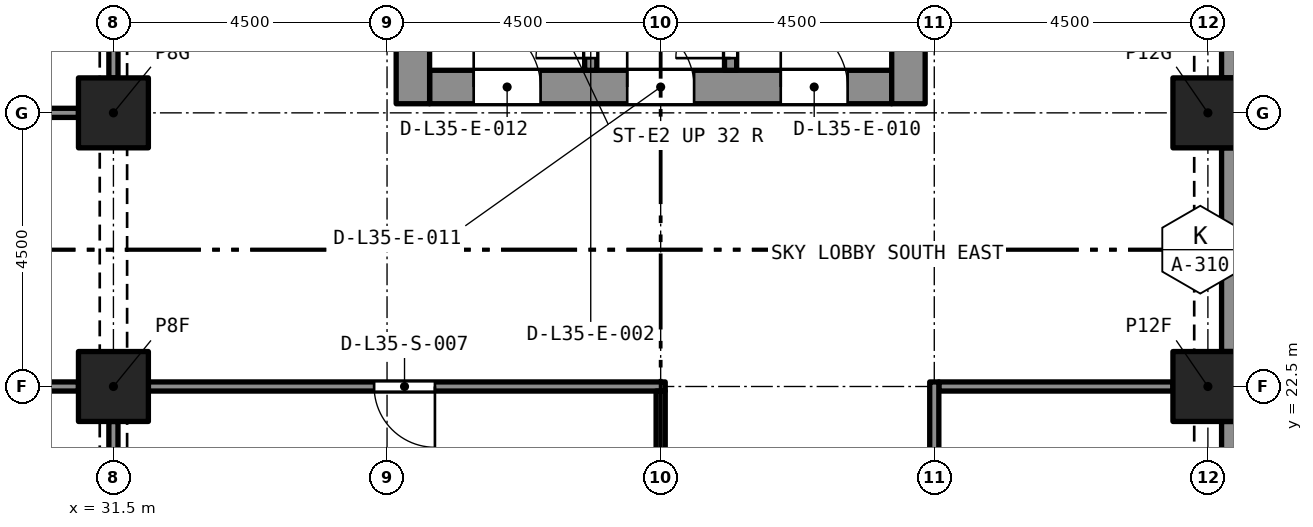
"""IFC4 building model, lengths in metres.
Left out: names, types, materials, properties, quantities, classifications, styles, units other than length and angle.
Written with IfcOpenShell. Run it as: python <this file> out.ifc"""

import sys

from ifc_helpers import new_model, si_unit, direction, frame, frame_2d, origin, origin_2d, place, context, subcontext, project, spatial, rectangle, extrude, element, fill, save


model = new_model("IFC4")
c1 = context("Model", 3, precision=1e-05, world=origin(), true_north=direction((0.0, 1.0)))
c2 = subcontext(c1, "Body", "Model", "MODEL_VIEW")
j1 = project(units=[si_unit("LENGTHUNIT", "METRE"), si_unit("PLANEANGLEUNIT", "RADIAN")], contexts=[c1])
p1 = place(None, origin())
s1 = spatial("IfcSite", under=j1, at=p1, CompositionType="ELEMENT")
p2 = place(p1, origin())
s2 = spatial("IfcBuilding", under=s1, at=p2, CompositionType="ELEMENT")
p3 = place(p2, frame((0.0, 0.0, 124.8)))
s3 = spatial("IfcBuildingStorey", under=s2, at=p3, CompositionType="ELEMENT", Elevation=124.8)
for number, where, z_axis, x_axis in (
    (1, (31.5, 22.5, 0.0), (0.0, 0.0, 1.0), (1.0, 0.0, 0.0)),
    (2, (49.5, 22.5, 0.0), (0.0, 0.0, 1.0), (1.0, 0.0, 0.0)),
    (3, (31.5, 27.0, 0.0), (0.0, 0.0, 1.0), (1.0, 0.0, 0.0)),
    (4, (49.5, 27.0, 0.0), (0.0, 0.0, 1.0), (1.0, 0.0, 0.0)),
):
    element("IfcColumn", number, at=place(p3, frame(where, z_axis=z_axis, x_axis=x_axis)), inside=s3, PredefinedType="COLUMN", context=c2, shape_type="SweptSolid", body=[
        extrude(rectangle(XDim=1.15, YDim=1.15, at=origin_2d()), origin(), (0.0, 0.0, 1.0), 5.4),
    ])
p4 = place(p3, frame((36.7, 27.425, 0.0), z_axis=(0.0, 0.0, 1.0), x_axis=(1.0, 0.0, 0.0)))
e5 = element("IfcWall", 5, at=p4, inside=s3, PredefinedType="SOLIDWALL", context=c2, shape_type="SweptSolid", body=[
    extrude(rectangle(XDim=7.6, YDim=0.55, at=frame_2d((3.8, 0.0))), origin(), (0.0, 0.0, 1.0), 5.4),
])
p5 = place(p4, frame((5.775, 0.0, 0.0)))
e6 = element("IfcOpeningElement", 6, at=p5, cuts=e5, PredefinedType="OPENING", context=c2, shape_type="SweptSolid", body=[
    extrude(rectangle(XDim=1.1, YDim=2.1, at=frame_2d((0.55, 1.05))), frame((0.0, 0.285, 0.0), z_axis=(0.0, -1.0, 0.0), x_axis=(1.0, 0.0, 0.0)), (0.0, 0.0, 1.0), 0.57),
])
p6 = place(p4, frame((3.25, 0.0, 0.0)))
e7 = element("IfcOpeningElement", 7, at=p6, cuts=e5, PredefinedType="OPENING", context=c2, shape_type="SweptSolid", body=[
    extrude(rectangle(XDim=1.1, YDim=2.1, at=frame_2d((0.55, 1.05))), frame((0.0, 0.285, 0.0), z_axis=(0.0, -1.0, 0.0), x_axis=(1.0, 0.0, 0.0)), (0.0, 0.0, 1.0), 0.57),
])
p7 = place(p4, frame((0.725, 0.0, 0.0)))
e8 = element("IfcOpeningElement", 8, at=p7, cuts=e5, PredefinedType="OPENING", context=c2, shape_type="SweptSolid", body=[
    extrude(rectangle(XDim=1.1, YDim=2.1, at=frame_2d((0.55, 1.05))), frame((0.0, 0.285, 0.0), z_axis=(0.0, -1.0, 0.0), x_axis=(1.0, 0.0, 0.0)), (0.0, 0.0, 1.0), 0.57),
])
p8 = place(p3, frame((36.425, 27.15, 0.0), z_axis=(0.0, 0.0, 1.0), x_axis=(0.0, 1.0, 0.0)))
e9 = element("IfcWall", 9, at=p8, inside=s3, PredefinedType="SOLIDWALL", context=c2, shape_type="SweptSolid", body=[
    extrude(rectangle(XDim=13.2, YDim=0.55, at=frame_2d((6.6, 0.0))), origin(), (0.0, 0.0, 1.0), 5.4),
])
p9 = place(p8, frame((8.8, 0.0, 0.0)))
e10 = element("IfcOpeningElement", 10, at=p9, cuts=e9, PredefinedType="OPENING", context=c2, shape_type="SweptSolid", body=[
    extrude(rectangle(XDim=1.2, YDim=2.1, at=frame_2d((0.6, 1.05))), frame((0.0, 0.285, 0.0), z_axis=(0.0, -1.0, 0.0), x_axis=(1.0, 0.0, 0.0)), (0.0, 0.0, 1.0), 0.57),
])
p10 = place(p3, frame((44.575, 27.15, 0.0), z_axis=(0.0, 0.0, 1.0), x_axis=(0.0, 1.0, 0.0)))
e11 = element("IfcWall", 11, at=p10, inside=s3, PredefinedType="SOLIDWALL", context=c2, shape_type="SweptSolid", body=[
    extrude(rectangle(XDim=13.2, YDim=0.55, at=frame_2d((6.6, 0.0))), origin(), (0.0, 0.0, 1.0), 5.4),
])
p11 = place(p10, frame((8.8, 0.0, 0.0)))
e12 = element("IfcOpeningElement", 12, at=p11, cuts=e11, PredefinedType="OPENING", context=c2, shape_type="SweptSolid", body=[
    extrude(rectangle(XDim=1.2, YDim=2.1, at=frame_2d((0.6, 1.05))), frame((0.0, 0.285, 0.0), z_axis=(0.0, -1.0, 0.0), x_axis=(1.0, 0.0, 0.0)), (0.0, 0.0, 1.0), 0.57),
])
for number, where, z_axis, x_axis in (
    (13, (49.875, 21.925, 0.0), (0.0, 0.0, 1.0), (0.0, -1.0, 0.0)),
    (14, (49.875, 26.425, 0.0), (0.0, 0.0, 1.0), (0.0, -1.0, 0.0)),
    (15, (49.875, 30.925, 0.0), (0.0, 0.0, 1.0), (0.0, -1.0, 0.0)),
):
    element("IfcWall", number, at=place(p3, frame(where, z_axis=z_axis, x_axis=x_axis)), inside=s3, PredefinedType="SOLIDWALL", context=c2, shape_type="SweptSolid", body=[
        extrude(rectangle(XDim=3.35, YDim=0.3, at=frame_2d((1.675, 0.0))), origin(), (0.0, 0.0, 1.0), 5.4),
    ])
p12 = place(p3, frame((41.65, 27.7, 0.0), z_axis=(0.0, 0.0, 1.0), x_axis=(0.0, 1.0, 0.0)))
e16 = element("IfcWall", 16, at=p12, inside=s3, PredefinedType="SOLIDWALL", context=c2, shape_type="SweptSolid", body=[
    extrude(rectangle(XDim=5.4, YDim=0.2, at=frame_2d((2.7, 0.0))), origin(), (0.0, 0.0, 1.0), 5.1),
])
p13 = place(p12, frame((0.2, 0.0, 0.0)))
e17 = element("IfcOpeningElement", 17, at=p13, cuts=e16, PredefinedType="OPENING", context=c2, shape_type="SweptSolid", body=[
    extrude(rectangle(XDim=0.9, YDim=2.1, at=frame_2d((0.45, 1.05))), frame((0.0, 0.11, 0.0), z_axis=(0.0, -1.0, 0.0), x_axis=(1.0, 0.0, 0.0)), (0.0, 0.0, 1.0), 0.22),
])
p14 = place(p3, frame((39.35, 27.7, 0.0), z_axis=(0.0, 0.0, 1.0), x_axis=(0.0, 1.0, 0.0)))
e18 = element("IfcWall", 18, at=p14, inside=s3, PredefinedType="SOLIDWALL", context=c2, shape_type="SweptSolid", body=[
    extrude(rectangle(XDim=5.4, YDim=0.2, at=frame_2d((2.7, 0.0))), origin(), (0.0, 0.0, 1.0), 5.1),
])
p15 = place(p14, frame((0.2, 0.0, 0.0)))
e19 = element("IfcOpeningElement", 19, at=p15, cuts=e18, PredefinedType="OPENING", context=c2, shape_type="SweptSolid", body=[
    extrude(rectangle(XDim=0.9, YDim=2.1, at=frame_2d((0.45, 1.05))), frame((0.0, 0.11, 0.0), z_axis=(0.0, -1.0, 0.0), x_axis=(1.0, 0.0, 0.0)), (0.0, 0.0, 1.0), 0.22),
])
p16 = place(p3, frame((18.575, 27.0, 0.0), z_axis=(0.0, 0.0, 1.0), x_axis=(1.0, 0.0, 0.0)))
e20 = element("IfcWall", 20, at=p16, inside=s3, PredefinedType="PARTITIONING", context=c2, shape_type="SweptSolid", body=[
    extrude(rectangle(XDim=12.35, YDim=0.15, at=frame_2d((6.175, 0.0))), origin(), (0.0, 0.0, 1.0), 4.95),
])
p17 = place(p16, frame((5.425, 0.0, 0.0)))
e21 = element("IfcOpeningElement", 21, at=p17, cuts=e20, PredefinedType="OPENING", context=c2, shape_type="SweptSolid", body=[
    extrude(rectangle(XDim=1.5, YDim=2.4, at=frame_2d((0.75, 1.2))), frame((0.0, 0.085, 0.0), z_axis=(0.0, -1.0, 0.0), x_axis=(1.0, 0.0, 0.0)), (0.0, 0.0, 1.0), 0.17),
])
p18 = place(p3, frame((30.925, 22.5, 0.0), z_axis=(0.0, 0.0, 1.0), x_axis=(-1.0, 0.0, 0.0)))
e22 = element("IfcWall", 22, at=p18, inside=s3, PredefinedType="PARTITIONING", context=c2, shape_type="SweptSolid", body=[
    extrude(rectangle(XDim=12.35, YDim=0.15, at=frame_2d((6.175, 0.0))), origin(), (0.0, 0.0, 1.0), 4.95),
])
p19 = place(p18, frame((5.425, 0.0, 0.0)))
e23 = element("IfcOpeningElement", 23, at=p19, cuts=e22, PredefinedType="OPENING", context=c2, shape_type="SweptSolid", body=[
    extrude(rectangle(XDim=1.5, YDim=2.4, at=frame_2d((0.75, 1.2))), frame((0.0, 0.085, 0.0), z_axis=(0.0, -1.0, 0.0), x_axis=(1.0, 0.0, 0.0)), (0.0, 0.0, 1.0), 0.17),
])
for number, where, z_axis, x_axis in (
    (24, (31.5, 27.575, 0.0), (0.0, 0.0, 1.0), (0.0, 1.0, 0.0)),
    (25, (31.5, 18.575, 0.0), (0.0, 0.0, 1.0), (0.0, 1.0, 0.0)),
):
    element("IfcWall", number, at=place(p3, frame(where, z_axis=z_axis, x_axis=x_axis)), inside=s3, PredefinedType="PARTITIONING", context=c2, shape_type="SweptSolid", body=[
        extrude(rectangle(XDim=3.35, YDim=0.15, at=frame_2d((1.675, 0.0))), origin(), (0.0, 0.0, 1.0), 4.58),
    ])
p20 = place(p3, frame((40.575, 22.5, 0.0), z_axis=(0.0, 0.0, 1.0), x_axis=(-1.0, 0.0, 0.0)))
e26 = element("IfcWall", 26, at=p20, inside=s3, PredefinedType="PARTITIONING", context=c2, shape_type="SweptSolid", body=[
    extrude(rectangle(XDim=8.5, YDim=0.15, at=frame_2d((4.25, 0.0))), origin(), (0.0, 0.0, 1.0), 5.1),
])
p21 = place(p20, frame((3.788, 0.0, 0.0)))
e27 = element("IfcOpeningElement", 27, at=p21, cuts=e26, PredefinedType="OPENING", context=c2, shape_type="SweptSolid", body=[
    extrude(rectangle(XDim=1.0, YDim=2.1, at=frame_2d((0.5, 1.05))), frame((0.0, 0.085, 0.0), z_axis=(0.0, -1.0, 0.0), x_axis=(1.0, 0.0, 0.0)), (0.0, 0.0, 1.0), 0.17),
])
p22 = place(p3, frame((45.075, 22.5, 0.0), z_axis=(0.0, 0.0, 1.0), x_axis=(1.0, 0.0, 0.0)))
e28 = element("IfcWall", 28, at=p22, inside=s3, PredefinedType="PARTITIONING", context=c2, shape_type="SweptSolid", body=[
    extrude(rectangle(XDim=3.85, YDim=0.15, at=frame_2d((1.925, 0.0))), origin(), (0.0, 0.0, 1.0), 5.1),
])
p23 = place(p3, frame((40.5, 13.5, 0.0), z_axis=(0.0, 0.0, 1.0), x_axis=(0.0, 1.0, 0.0)))
e29 = element("IfcWall", 29, at=p23, inside=s3, PredefinedType="PARTITIONING", context=c2, shape_type="SweptSolid", body=[
    extrude(rectangle(XDim=8.925, YDim=0.15, at=frame_2d((4.462, 0.0))), origin(), (0.0, 0.0, 1.0), 5.1),
])
p24 = place(p23, frame((4.0, 0.0, 0.0)))
e30 = element("IfcOpeningElement", 30, at=p24, cuts=e29, PredefinedType="OPENING", context=c2, shape_type="SweptSolid", body=[
    extrude(rectangle(XDim=1.0, YDim=2.1, at=frame_2d((0.5, 1.05))), frame((0.0, 0.085, 0.0), z_axis=(0.0, -1.0, 0.0), x_axis=(1.0, 0.0, 0.0)), (0.0, 0.0, 1.0), 0.17),
])
p25 = place(p3, frame((45.0, 22.575, 0.0), z_axis=(0.0, 0.0, 1.0), x_axis=(0.0, -1.0, 0.0)))
e31 = element("IfcWall", 31, at=p25, inside=s3, PredefinedType="PARTITIONING", context=c2, shape_type="SweptSolid", body=[
    extrude(rectangle(XDim=9.075, YDim=0.15, at=frame_2d((4.538, 0.0))), origin(), (0.0, 0.0, 1.0), 5.1),
])
p26 = place(p25, frame((4.175, 0.0, 0.0)))
e32 = element("IfcOpeningElement", 32, at=p26, cuts=e31, PredefinedType="OPENING", context=c2, shape_type="SweptSolid", body=[
    extrude(rectangle(XDim=0.8, YDim=2.1, at=frame_2d((0.4, 1.05))), frame((0.0, 0.085, 0.0), z_axis=(0.0, -1.0, 0.0), x_axis=(1.0, 0.0, 0.0)), (0.0, 0.0, 1.0), 0.17),
])
p27 = place(p13, origin())
e33 = element("IfcDoor", 33, at=p27, inside=s3, OperationType="SINGLE_SWING_LEFT", PredefinedType="DOOR", context=c2, shape_type="SweptSolid", body=[
    extrude(rectangle(XDim=0.9, YDim=2.1, at=frame_2d((0.45, 1.05))), frame((0.0, 0.025, 0.0), z_axis=(0.0, -1.0, 0.0), x_axis=(1.0, 0.0, 0.0)), (0.0, 0.0, 1.0), 0.05),
])
fill(e17, e33)
p28 = place(p15, origin())
e34 = element("IfcDoor", 34, at=p28, inside=s3, OperationType="SINGLE_SWING_LEFT", PredefinedType="DOOR", context=c2, shape_type="SweptSolid", body=[
    extrude(rectangle(XDim=0.9, YDim=2.1, at=frame_2d((0.45, 1.05))), frame((0.0, 0.025, 0.0), z_axis=(0.0, -1.0, 0.0), x_axis=(1.0, 0.0, 0.0)), (0.0, 0.0, 1.0), 0.05),
])
fill(e19, e34)
p29 = place(p5, origin())
e35 = element("IfcDoor", 35, at=p29, inside=s3, OperationType="SINGLE_SWING_LEFT", PredefinedType="DOOR", context=c2, shape_type="SweptSolid", body=[
    extrude(rectangle(XDim=1.1, YDim=2.1, at=frame_2d((0.55, 1.05))), frame((0.0, 0.025, 0.0), z_axis=(0.0, -1.0, 0.0), x_axis=(1.0, 0.0, 0.0)), (0.0, 0.0, 1.0), 0.05),
])
fill(e6, e35)
p30 = place(p6, origin())
e36 = element("IfcDoor", 36, at=p30, inside=s3, OperationType="SINGLE_SWING_LEFT", PredefinedType="DOOR", context=c2, shape_type="SweptSolid", body=[
    extrude(rectangle(XDim=1.1, YDim=2.1, at=frame_2d((0.55, 1.05))), frame((0.0, 0.025, 0.0), z_axis=(0.0, -1.0, 0.0), x_axis=(1.0, 0.0, 0.0)), (0.0, 0.0, 1.0), 0.05),
])
fill(e7, e36)
p31 = place(p7, origin())
e37 = element("IfcDoor", 37, at=p31, inside=s3, OperationType="SINGLE_SWING_LEFT", PredefinedType="DOOR", context=c2, shape_type="SweptSolid", body=[
    extrude(rectangle(XDim=1.1, YDim=2.1, at=frame_2d((0.55, 1.05))), frame((0.0, 0.025, 0.0), z_axis=(0.0, -1.0, 0.0), x_axis=(1.0, 0.0, 0.0)), (0.0, 0.0, 1.0), 0.05),
])
fill(e8, e37)
p32 = place(p21, origin())
e38 = element("IfcDoor", 38, at=p32, inside=s3, OperationType="SINGLE_SWING_RIGHT", PredefinedType="DOOR", context=c2, shape_type="SweptSolid", body=[
    extrude(rectangle(XDim=1.0, YDim=2.1, at=frame_2d((0.5, 1.05))), frame((0.0, 0.025, 0.0), z_axis=(0.0, -1.0, 0.0), x_axis=(1.0, 0.0, 0.0)), (0.0, 0.0, 1.0), 0.05),
])
fill(e27, e38)
save(model, sys.argv[1])
